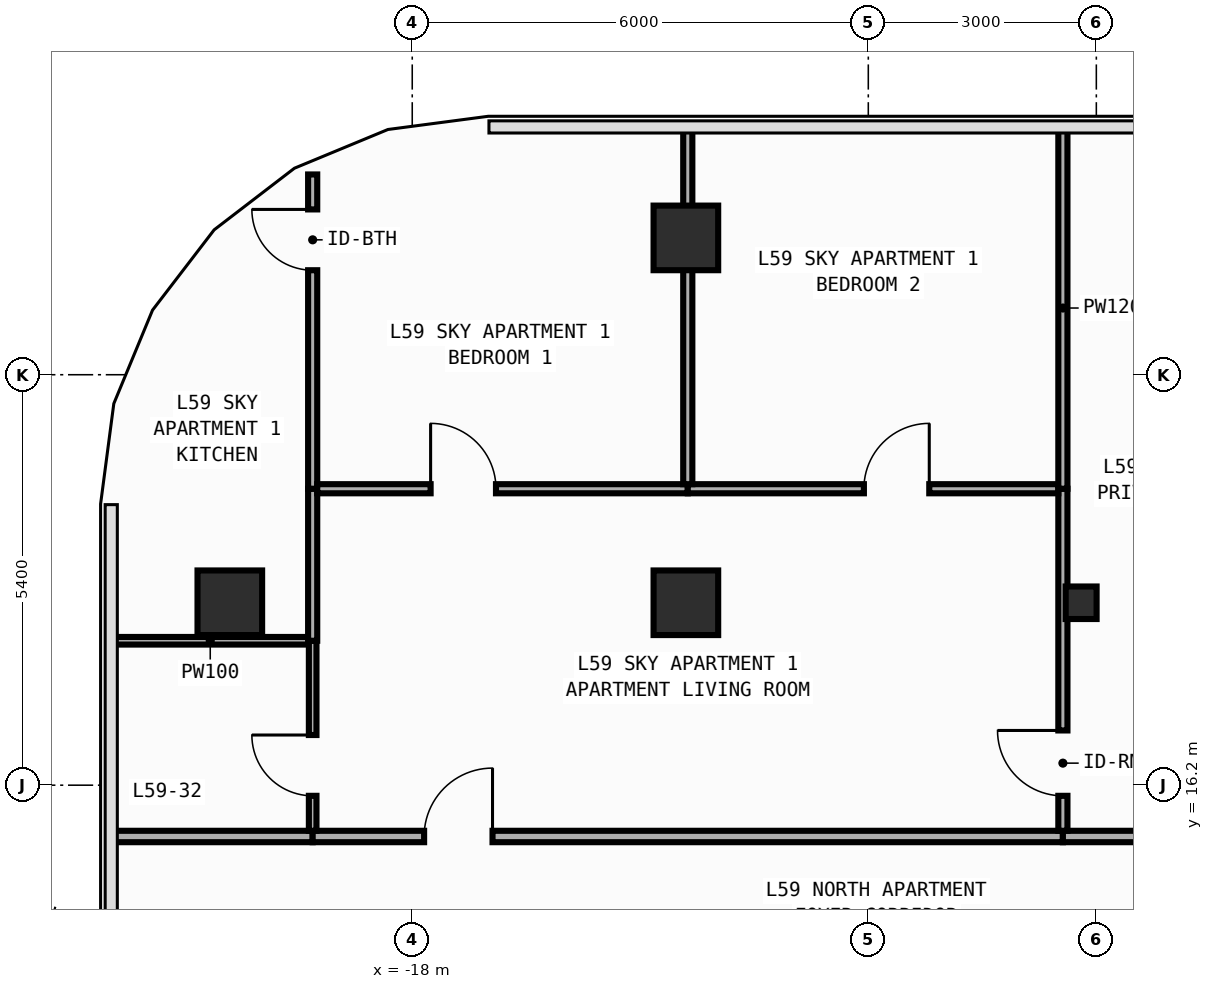
"""IFC4 building model, lengths in metres.
Left out: names, types, materials, properties, quantities, classifications, styles, units other than length and angle.
Written with IfcOpenShell. Run it as: python <this file> out.ifc"""

import sys

from ifc_helpers import new_model, si_unit, direction, frame, frame_2d, origin, origin_2d, place, context, subcontext, project, spatial, rectangle, i_section, extrude, element, fill, save


model = new_model("IFC4")
c1 = context("Model", 3, precision=1e-05, world=origin(), true_north=direction((0.0, 1.0)))
c2 = subcontext(c1, "Body", "Model", "MODEL_VIEW")
j1 = project(units=[si_unit("LENGTHUNIT", "METRE"), si_unit("PLANEANGLEUNIT", "RADIAN")], contexts=[c1])
p1 = place(None, origin())
s1 = spatial("IfcSite", under=j1, at=p1, CompositionType="ELEMENT")
p2 = place(p1, origin())
s2 = spatial("IfcBuilding", under=s1, at=p2, CompositionType="ELEMENT")
p3 = place(p2, frame((0.0, 0.0, 251.2)))
s3 = spatial("IfcBuildingStorey", under=s2, at=p3, CompositionType="ELEMENT", Elevation=251.2)
p4 = place(p3, frame((-9.2, 18.6, 0.0), z_axis=(0.0, 0.0, 1.0), x_axis=(1.0, 0.0, 0.0)))
e1 = element("IfcColumn", 1, at=p4, inside=s3, PredefinedType="COLUMN", context=c2, shape_type="SweptSolid", body=[
    extrude(i_section(OverallWidth=0.407, OverallDepth=0.428, WebThickness=0.02, FlangeThickness=0.035, FilletRadius=0.022, at=origin_2d()), origin(), (0.0, 0.0, 1.0), 3.6),
])
for number, where, z_axis, x_axis in (
    (2, (-20.4, 18.6, 0.0), (0.0, 0.0, 1.0), (1.0, 0.0, 0.0)),
    (3, (-14.4, 18.6, 0.0), (0.0, 0.0, 1.0), (1.0, 0.0, 0.0)),
    (4, (-14.4, 23.4, 0.0), (0.0, 0.0, 1.0), (1.0, 0.0, 0.0)),
):
    element("IfcColumn", number, at=place(p3, frame(where, z_axis=z_axis, x_axis=x_axis)), inside=s3, PredefinedType="COLUMN", context=c2, shape_type="SweptSolid", body=[
        extrude(rectangle(XDim=0.85, YDim=0.85, at=origin_2d()), origin(), (0.0, 0.0, 1.0), 3.6),
    ])
p5 = place(p3, frame((-21.955, 15.525, 0.0), z_axis=(0.0, 0.0, 1.0), x_axis=(1.0, 0.0, 0.0)))
e5 = element("IfcWall", 5, at=p5, inside=s3, PredefinedType="PARTITIONING", context=c2, shape_type="SweptSolid", body=[
    extrude(rectangle(XDim=2.645, YDim=0.15, at=frame_2d((1.323, 0.0))), origin(), (0.0, 0.0, 1.0), 3.34),
])
p6 = place(p3, frame((-19.31, 15.525, 0.0), z_axis=(0.0, 0.0, 1.0), x_axis=(1.0, 0.0, 0.0)))
e6 = element("IfcWall", 6, at=p6, inside=s3, PredefinedType="PARTITIONING", context=c2, shape_type="SweptSolid", body=[
    extrude(rectangle(XDim=9.87, YDim=0.15, at=frame_2d((4.935, 0.0))), origin(), (0.0, 0.0, 1.0), 3.34),
])
p7 = place(p6, frame((1.466, 0.0, 0.0)))
e7 = element("IfcOpeningElement", 7, at=p7, cuts=e6, PredefinedType="OPENING", context=c2, shape_type="SweptSolid", body=[
    extrude(rectangle(XDim=0.9, YDim=2.15, at=frame_2d((0.45, 1.075))), frame((0.0, 0.085, 0.0), z_axis=(0.0, -1.0, 0.0), x_axis=(1.0, 0.0, 0.0)), (0.0, 0.0, 1.0), 0.17),
])
p8 = place(p3, frame((-9.44, 15.525, 0.0), z_axis=(0.0, 0.0, 1.0), x_axis=(1.0, 0.0, 0.0)))
e8 = element("IfcWall", 8, at=p8, inside=s3, PredefinedType="PARTITIONING", context=c2, shape_type="SweptSolid", body=[
    extrude(rectangle(XDim=4.04, YDim=0.15, at=frame_2d((2.02, 0.0))), origin(), (0.0, 0.0, 1.0), 3.34),
])
p9 = place(p3, frame((-21.955, 18.1, 0.0), z_axis=(0.0, 0.0, 1.0), x_axis=(1.0, 0.0, 0.0)))
e9 = element("IfcWall", 9, at=p9, inside=s3, PredefinedType="PARTITIONING", context=c2, shape_type="SweptSolid", body=[
    extrude(rectangle(XDim=2.595, YDim=0.1, at=frame_2d((1.297, 0.0))), origin(), (0.0, 0.0, 1.0), 3.34),
])
p10 = place(p3, frame((-19.31, 15.6, 0.0), z_axis=(0.0, 0.0, 1.0), x_axis=(0.0, 1.0, 0.0)))
e10 = element("IfcWall", 10, at=p10, inside=s3, PredefinedType="PARTITIONING", context=c2, shape_type="SweptSolid", body=[
    extrude(rectangle(XDim=2.5, YDim=0.1, at=frame_2d((1.25, 0.0))), origin(), (0.0, 0.0, 1.0), 3.34),
])
p11 = place(p10, frame((0.46, 0.0, 0.0)))
e11 = element("IfcOpeningElement", 11, at=p11, cuts=e10, PredefinedType="OPENING", context=c2, shape_type="SweptSolid", body=[
    extrude(rectangle(XDim=0.8, YDim=2.1, at=frame_2d((0.4, 1.05))), frame((0.0, 0.06, 0.0), z_axis=(0.0, -1.0, 0.0), x_axis=(1.0, 0.0, 0.0)), (0.0, 0.0, 1.0), 0.12),
])
p12 = place(p3, frame((-19.31, 18.1, 0.0), z_axis=(0.0, 0.0, 1.0), x_axis=(0.0, 1.0, 0.0)))
e12 = element("IfcWall", 12, at=p12, inside=s3, PredefinedType="PARTITIONING", context=c2, shape_type="SweptSolid", body=[
    extrude(rectangle(XDim=2.0, YDim=0.12, at=frame_2d((1.0, 0.0))), origin(), (0.0, 0.0, 1.0), 3.34),
])
p13 = place(p3, frame((-19.31, 20.1, 0.0), z_axis=(0.0, 0.0, 1.0), x_axis=(0.0, 1.0, 0.0)))
e13 = element("IfcWall", 13, at=p13, inside=s3, PredefinedType="PARTITIONING", context=c2, shape_type="SweptSolid", body=[
    extrude(rectangle(XDim=4.135, YDim=0.12, at=frame_2d((2.067, 0.0))), origin(), (0.0, 0.0, 1.0), 3.34),
])
p14 = place(p13, frame((2.875, 0.0, 0.0)))
e14 = element("IfcOpeningElement", 14, at=p14, cuts=e13, PredefinedType="OPENING", context=c2, shape_type="SweptSolid", body=[
    extrude(rectangle(XDim=0.8, YDim=2.1, at=frame_2d((0.4, 1.05))), frame((0.0, 0.07, 0.0), z_axis=(0.0, -1.0, 0.0), x_axis=(1.0, 0.0, 0.0)), (0.0, 0.0, 1.0), 0.14),
])
p15 = place(p3, frame((-9.44, 15.6, 0.0), z_axis=(0.0, 0.0, 1.0), x_axis=(0.0, 1.0, 0.0)))
e15 = element("IfcWall", 15, at=p15, inside=s3, PredefinedType="PARTITIONING", context=c2, shape_type="SweptSolid", body=[
    extrude(rectangle(XDim=4.5, YDim=0.12, at=frame_2d((2.25, 0.0))), origin(), (0.0, 0.0, 1.0), 2.44),
])
p16 = place(p15, frame((0.46, 0.0, 0.0)))
e16 = element("IfcOpeningElement", 16, at=p16, cuts=e15, PredefinedType="OPENING", context=c2, shape_type="SweptSolid", body=[
    extrude(rectangle(XDim=0.86, YDim=2.15, at=frame_2d((0.43, 1.075))), frame((0.0, 0.07, 0.0), z_axis=(0.0, -1.0, 0.0), x_axis=(1.0, 0.0, 0.0)), (0.0, 0.0, 1.0), 0.14),
])
p17 = place(p3, frame((-19.25, 20.1, 0.0), z_axis=(0.0, 0.0, 1.0), x_axis=(1.0, 0.0, 0.0)))
e17 = element("IfcWall", 17, at=p17, inside=s3, PredefinedType="PARTITIONING", context=c2, shape_type="SweptSolid", body=[
    extrude(rectangle(XDim=4.875, YDim=0.12, at=frame_2d((2.438, 0.0))), origin(), (0.0, 0.0, 1.0), 3.34),
])
p18 = place(p17, frame((1.492, 0.0, 0.0)))
e18 = element("IfcOpeningElement", 18, at=p18, cuts=e17, PredefinedType="OPENING", context=c2, shape_type="SweptSolid", body=[
    extrude(rectangle(XDim=0.86, YDim=2.15, at=frame_2d((0.43, 1.075))), frame((0.0, 0.07, 0.0), z_axis=(0.0, -1.0, 0.0), x_axis=(1.0, 0.0, 0.0)), (0.0, 0.0, 1.0), 0.14),
])
p19 = place(p3, frame((-14.375, 20.1, 0.0), z_axis=(0.0, 0.0, 1.0), x_axis=(1.0, 0.0, 0.0)))
e19 = element("IfcWall", 19, at=p19, inside=s3, PredefinedType="PARTITIONING", context=c2, shape_type="SweptSolid", body=[
    extrude(rectangle(XDim=4.875, YDim=0.12, at=frame_2d((2.438, 0.0))), origin(), (0.0, 0.0, 1.0), 3.34),
])
p20 = place(p19, frame((2.317, 0.0, 0.0)))
e20 = element("IfcOpeningElement", 20, at=p20, cuts=e19, PredefinedType="OPENING", context=c2, shape_type="SweptSolid", body=[
    extrude(rectangle(XDim=0.86, YDim=2.15, at=frame_2d((0.43, 1.075))), frame((0.0, 0.07, 0.0), z_axis=(0.0, -1.0, 0.0), x_axis=(1.0, 0.0, 0.0)), (0.0, 0.0, 1.0), 0.14),
])
p21 = place(p3, frame((-9.44, 20.1, 0.0), z_axis=(0.0, 0.0, 1.0), x_axis=(0.0, 1.0, 0.0)))
e21 = element("IfcWall", 21, at=p21, inside=s3, PredefinedType="PARTITIONING", context=c2, shape_type="SweptSolid", body=[
    extrude(rectangle(XDim=4.755, YDim=0.12, at=frame_2d((2.377, 0.0))), origin(), (0.0, 0.0, 1.0), 3.34),
])
p22 = place(p3, frame((-14.375, 20.16, 0.0), z_axis=(0.0, 0.0, 1.0), x_axis=(0.0, 1.0, 0.0)))
e22 = element("IfcWall", 22, at=p22, inside=s3, PredefinedType="PARTITIONING", context=c2, shape_type="SweptSolid", body=[
    extrude(rectangle(XDim=4.695, YDim=0.12, at=frame_2d((2.348, 0.0))), origin(), (0.0, 0.0, 1.0), 2.44),
])
p23 = place(p7, origin())
e23 = element("IfcDoor", 23, at=p23, inside=s3, OperationType="SINGLE_SWING_RIGHT", PredefinedType="DOOR", context=c2, shape_type="SweptSolid", body=[
    extrude(rectangle(XDim=0.9, YDim=2.15, at=frame_2d((0.45, 1.075))), frame((0.0, 0.025, 0.0), z_axis=(0.0, -1.0, 0.0), x_axis=(1.0, 0.0, 0.0)), (0.0, 0.0, 1.0), 0.05),
])
fill(e7, e23)
p24 = place(p11, origin())
e24 = element("IfcDoor", 24, at=p24, inside=s3, OperationType="SINGLE_SWING_RIGHT", PredefinedType="DOOR", context=c2, shape_type="SweptSolid", body=[
    extrude(rectangle(XDim=0.8, YDim=2.1, at=frame_2d((0.4, 1.05))), frame((0.0, 0.025, 0.0), z_axis=(0.0, -1.0, 0.0), x_axis=(1.0, 0.0, 0.0)), (0.0, 0.0, 1.0), 0.05),
])
fill(e11, e24)
p25 = place(p16, origin())
e25 = element("IfcDoor", 25, at=p25, inside=s3, OperationType="SINGLE_SWING_RIGHT", PredefinedType="DOOR", context=c2, shape_type="SweptSolid", body=[
    extrude(rectangle(XDim=0.86, YDim=2.15, at=frame_2d((0.43, 1.075))), frame((0.0, 0.025, 0.0), z_axis=(0.0, -1.0, 0.0), x_axis=(1.0, 0.0, 0.0)), (0.0, 0.0, 1.0), 0.05),
])
fill(e16, e25)
p26 = place(p18, origin())
e26 = element("IfcDoor", 26, at=p26, inside=s3, OperationType="SINGLE_SWING_LEFT", PredefinedType="DOOR", context=c2, shape_type="SweptSolid", body=[
    extrude(rectangle(XDim=0.86, YDim=2.15, at=frame_2d((0.43, 1.075))), frame((0.0, 0.025, 0.0), z_axis=(0.0, -1.0, 0.0), x_axis=(1.0, 0.0, 0.0)), (0.0, 0.0, 1.0), 0.05),
])
fill(e18, e26)
p27 = place(p20, origin())
e27 = element("IfcDoor", 27, at=p27, inside=s3, OperationType="SINGLE_SWING_RIGHT", PredefinedType="DOOR", context=c2, shape_type="SweptSolid", body=[
    extrude(rectangle(XDim=0.86, YDim=2.15, at=frame_2d((0.43, 1.075))), frame((0.0, 0.025, 0.0), z_axis=(0.0, -1.0, 0.0), x_axis=(1.0, 0.0, 0.0)), (0.0, 0.0, 1.0), 0.05),
])
fill(e20, e27)
p28 = place(p14, origin())
e28 = element("IfcDoor", 28, at=p28, inside=s3, OperationType="SINGLE_SWING_RIGHT", PredefinedType="DOOR", context=c2, shape_type="SweptSolid", body=[
    extrude(rectangle(XDim=0.8, YDim=2.1, at=frame_2d((0.4, 1.05))), frame((0.0, 0.025, 0.0), z_axis=(0.0, -1.0, 0.0), x_axis=(1.0, 0.0, 0.0)), (0.0, 0.0, 1.0), 0.05),
])
fill(e14, e28)
save(model, sys.argv[1])
